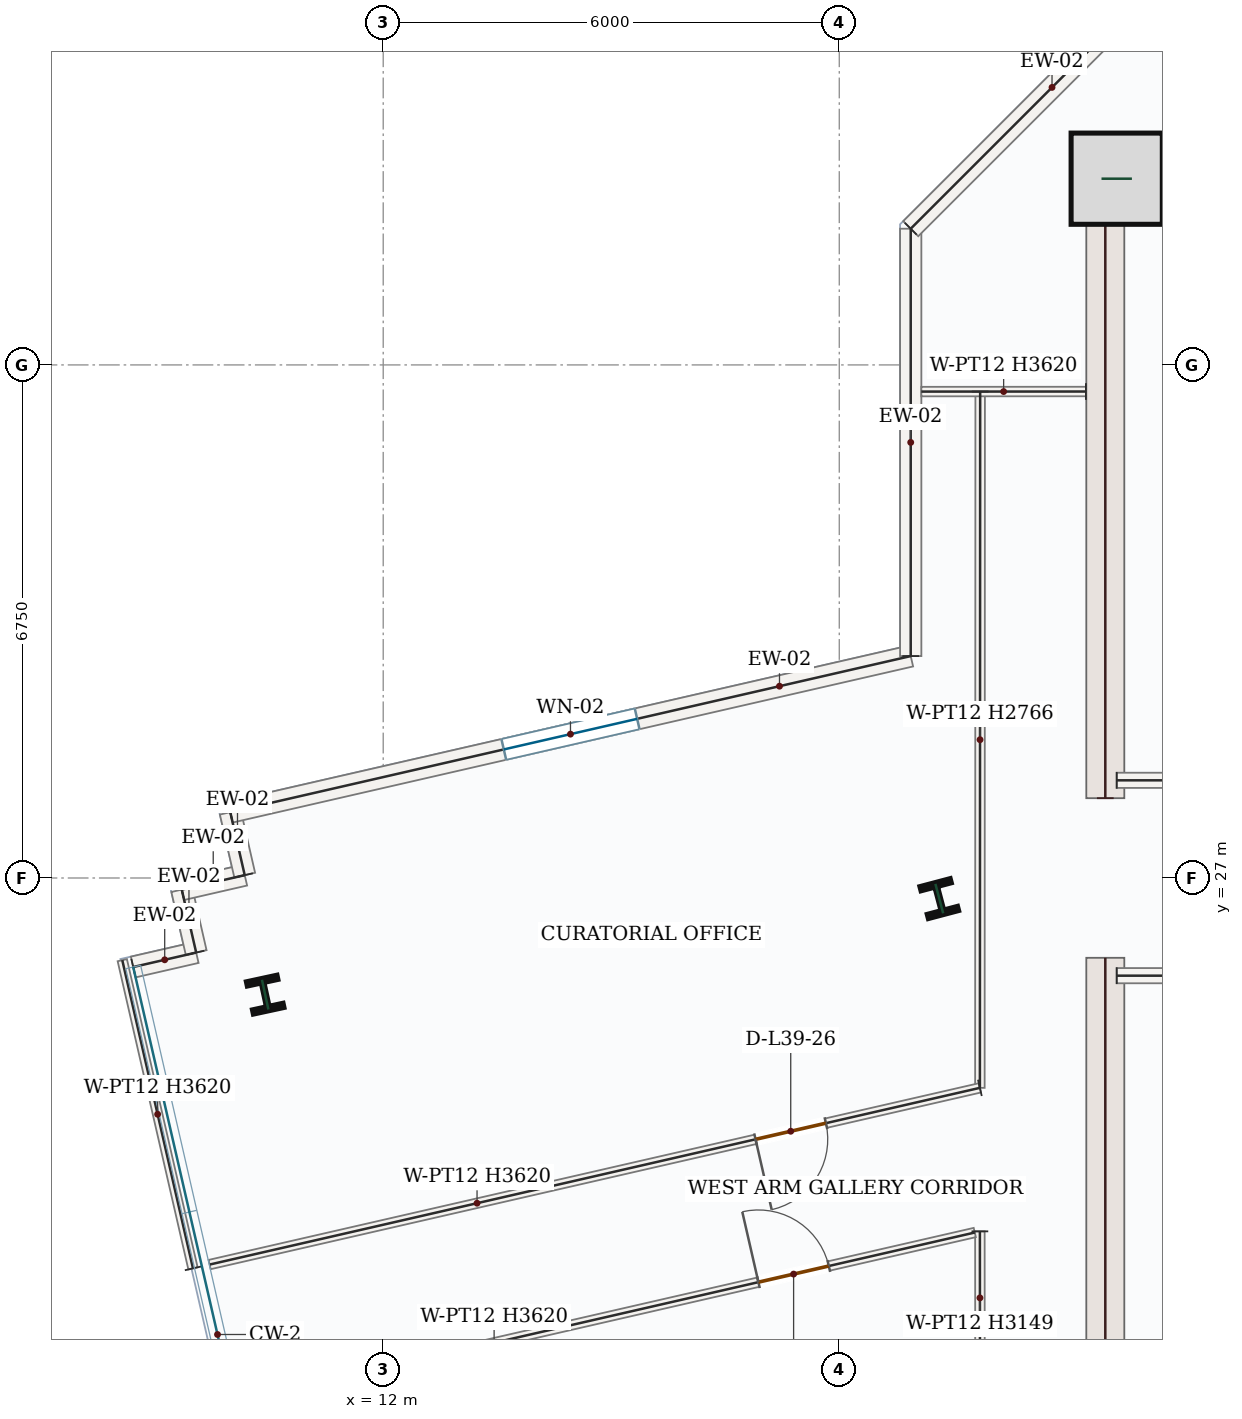
"""IFC4 building model, lengths in metres.
Left out: names, types, materials, properties, quantities, classifications, styles, units other than length and angle.
Written with IfcOpenShell. Run it as: python <this file> out.ifc"""

import sys

from ifc_helpers import new_model, si_unit, direction, frame, frame_2d, origin, origin_2d, place, context, subcontext, project, spatial, rectangle, i_section, extrude, source, transform, mapped, element, fill, save


model = new_model("IFC4")
c1 = context("Model", 3, precision=1e-05, world=origin(), true_north=direction((0.0, 1.0)))
c2 = subcontext(c1, "Body", "Model", "MODEL_VIEW")
j1 = project(units=[si_unit("LENGTHUNIT", "METRE"), si_unit("PLANEANGLEUNIT", "RADIAN")], contexts=[c1])
p1 = place(None, origin())
s1 = spatial("IfcSite", under=j1, at=p1, CompositionType="ELEMENT")
p2 = place(p1, origin())
s2 = spatial("IfcBuilding", under=s1, at=p2, CompositionType="ELEMENT")
p3 = place(p2, frame((0.0, 0.0, 170.7)))
s3 = spatial("IfcBuildingStorey", under=s2, at=p3, CompositionType="ELEMENT", Elevation=170.7)
m1 = source(origin(), c2, "Body", "SweptSolid", [
    extrude(rectangle(XDim=8.55, YDim=0.5, at=frame_2d((4.275, 0.0))), origin(), (0.0, 0.0, 1.0), 3.62),
])
for number, where, z_axis, x_axis in (
    (1, (21.5, 17.4, 0.0), (0.0, 0.0, 1.0), (0.0, 1.0, 0.0)),
    (2, (21.5, 28.05, 0.0), (0.0, 0.0, 1.0), (0.0, 1.0, 0.0)),
):
    element("IfcWall", number, at=place(p3, frame(where, z_axis=z_axis, x_axis=x_axis)), inside=s3, PredefinedType="SHEAR", context=c2, shape_type="MappedRepresentation", body=[
        mapped(m1, transform((0.0, 0.0, 0.0), x_axis=(1.0, 0.0, 0.0), y_axis=(0.0, 1.0, 0.0), z_axis=(0.0, 0.0, 1.0), scale=1.0)),
    ])
m2 = source(origin(), c2, "Body", "SweptSolid", [
    extrude(rectangle(XDim=7.0, YDim=0.5, at=frame_2d((3.5, 0.0))), origin(), (0.0, 0.0, 1.0), 3.62),
])
p4 = place(p3, frame((21.75, 36.35, 0.0), z_axis=(0.0, 0.0, 1.0), x_axis=(1.0, 0.0, 0.0)))
e3 = element("IfcWall", 3, at=p4, inside=s3, PredefinedType="SHEAR", context=c2, shape_type="MappedRepresentation", body=[
    mapped(m2, transform((0.0, 0.0, 0.0), x_axis=(1.0, 0.0, 0.0), y_axis=(0.0, 1.0, 0.0), z_axis=(0.0, 0.0, 1.0), scale=1.0)),
])
m3 = source(origin(), c2, "Body", "SweptSolid", [
    extrude(rectangle(XDim=1.2, YDim=1.2, at=origin_2d()), origin(), (0.0, 0.0, 1.0), 3.9),
])
p5 = place(p3, frame((21.65, 36.2, 0.0), z_axis=(0.0, 0.0, 1.0), x_axis=(1.0, 0.0, 0.0)))
e4 = element("IfcColumn", 4, at=p5, inside=s3, PredefinedType="COLUMN", context=c2, shape_type="MappedRepresentation", body=[
    mapped(m3, transform((0.0, 0.0, 0.0), x_axis=(1.0, 0.0, 0.0), y_axis=(0.0, 1.0, 0.0), z_axis=(0.0, 0.0, 1.0), scale=1.0)),
])
m4 = source(origin(), c2, "Body", "SweptSolid", [
    extrude(i_section(OverallWidth=0.412, OverallDepth=0.435, WebThickness=0.036, FlangeThickness=0.057, FilletRadius=0.018, at=origin_2d()), origin(), (0.0, 0.0, 1.0), 3.9),
])
for number, where, z_axis, x_axis in (
    (5, (19.316, 26.729, 0.0), (0.0, 0.0, 1.0), (0.967, 0.255, 0.0)),
    (6, (10.447, 25.465, 0.0), (0.0, 0.0, 1.0), (0.977, 0.211, 0.0)),
):
    element("IfcColumn", number, at=place(p3, frame(where, z_axis=z_axis, x_axis=x_axis)), inside=s3, PredefinedType="COLUMN", context=c2, shape_type="MappedRepresentation", body=[
        mapped(m4, transform((0.0, 0.0, 0.0), x_axis=(1.0, 0.0, 0.0), y_axis=(0.0, 1.0, 0.0), z_axis=(0.0, 0.0, 1.0), scale=1.0)),
    ])
m5 = source(origin(), c2, "Body", "SweptSolid", [
    extrude(rectangle(XDim=0.85, YDim=0.28, at=frame_2d((0.425, 0.0))), origin(), (0.0, 0.0, 1.0), 3.62),
])
p6 = place(p3, frame((8.711, 25.829, 0.0), z_axis=(0.0, 0.0, 1.0), x_axis=(0.974704946586, 0.223495563939, 0.0)))
e7 = element("IfcWall", 7, at=p6, inside=s3, PredefinedType="SOLIDWALL", context=c2, shape_type="MappedRepresentation", body=[
    mapped(m5, transform((0.0, 0.0, 0.0), x_axis=(1.0, 0.0, 0.0), y_axis=(0.0, 1.0, 0.0), z_axis=(0.0, 0.0, 1.0), scale=1.0)),
])
m6 = source(origin(), c2, "Body", "SweptSolid", [
    extrude(rectangle(XDim=0.85, YDim=0.28, at=frame_2d((0.425, 0.0))), origin(), (0.0, 0.0, 1.0), 3.62),
])
p7 = place(p3, frame((9.539, 26.019, 0.0), z_axis=(0.0, 0.0, 1.0), x_axis=(-0.22316012353, 0.974781800849, 0.0)))
e8 = element("IfcWall", 8, at=p7, inside=s3, PredefinedType="SOLIDWALL", context=c2, shape_type="MappedRepresentation", body=[
    mapped(m6, transform((0.0, 0.0, 0.0), x_axis=(1.0, 0.0, 0.0), y_axis=(0.0, 1.0, 0.0), z_axis=(0.0, 0.0, 1.0), scale=1.0)),
])
for number, where, z_axis, x_axis in (
    (9, (9.35, 26.847, 0.0), (0.0, 0.0, 1.0), (0.975, 0.223, 0.0)),
    (10, (10.178, 27.037, 0.0), (0.0, 0.0, 1.0), (-0.224, 0.975, 0.0)),
):
    element("IfcWall", number, at=place(p3, frame(where, z_axis=z_axis, x_axis=x_axis)), inside=s3, PredefinedType="SOLIDWALL", context=c2, shape_type="MappedRepresentation", body=[
        mapped(m5, transform((0.0, 0.0, 0.0), x_axis=(1.0, 0.0, 0.0), y_axis=(0.0, 1.0, 0.0), z_axis=(0.0, 0.0, 1.0), scale=1.0)),
    ])
p8 = place(p3, frame((9.988, 27.866, 0.0), z_axis=(0.0, 0.0, 1.0), x_axis=(0.974680686557, 0.223601340005, 0.0)))
e11 = element("IfcWall", 11, at=p8, inside=s3, PredefinedType="SOLIDWALL", context=c2, shape_type="SweptSolid", body=[
    extrude(rectangle(XDim=9.185, YDim=0.28, at=frame_2d((4.592, 0.0))), origin(), (0.0, 0.0, 1.0), 3.62),
])
p9 = place(p8, frame((3.692, 0.0, 0.85)))
e12 = element("IfcOpeningElement", 12, at=p9, cuts=e11, PredefinedType="OPENING", context=c2, shape_type="SweptSolid", body=[
    extrude(rectangle(XDim=1.8, YDim=1.75, at=frame_2d((0.9, 0.875))), frame((0.0, 0.15, 0.0), z_axis=(0.0, -1.0, 0.0), x_axis=(1.0, 0.0, 0.0)), (0.0, 0.0, 1.0), 0.3),
])
m7 = source(origin(), c2, "Body", "SweptSolid", [
    extrude(rectangle(XDim=5.623, YDim=0.28, at=frame_2d((2.811, 0.0))), origin(), (0.0, 0.0, 1.0), 3.62),
])
p10 = place(p3, frame((18.94, 29.919, 0.0), z_axis=(0.0, 0.0, 1.0), x_axis=(0.0, 1.0, 0.0)))
e13 = element("IfcWall", 13, at=p10, inside=s3, PredefinedType="SOLIDWALL", context=c2, shape_type="MappedRepresentation", body=[
    mapped(m7, transform((0.0, 0.0, 0.0), x_axis=(1.0, 0.0, 0.0), y_axis=(0.0, 1.0, 0.0), z_axis=(0.0, 0.0, 1.0), scale=1.0)),
])
m8 = source(origin(), c2, "Body", "SweptSolid", [
    extrude(rectangle(XDim=5.258, YDim=0.28, at=frame_2d((2.629, 0.0))), origin(), (0.0, 0.0, 1.0), 3.62),
])
p11 = place(p3, frame((18.94, 35.542, 0.0), z_axis=(0.0, 0.0, 1.0), x_axis=(0.707106781187, 0.707106781187, 0.0)))
e14 = element("IfcWall", 14, at=p11, inside=s3, PredefinedType="SOLIDWALL", context=c2, shape_type="MappedRepresentation", body=[
    mapped(m8, transform((0.0, 0.0, 0.0), x_axis=(1.0, 0.0, 0.0), y_axis=(0.0, 1.0, 0.0), z_axis=(0.0, 0.0, 1.0), scale=1.0)),
])
m9 = source(origin(), c2, "Body", "SweptSolid", [
    extrude(rectangle(XDim=4.25, YDim=0.2, at=frame_2d((2.125, 0.0))), origin(), (0.0, 0.0, 1.0), 3.62),
])
for number, where, z_axis, x_axis in (
    (15, (21.65, 25.715, 0.0), (0.0, 0.0, 1.0), (1.0, 0.0, 0.0)),
    (16, (21.65, 28.285, 0.0), (0.0, 0.0, 1.0), (1.0, 0.0, 0.0)),
):
    element("IfcWall", number, at=place(p3, frame(where, z_axis=z_axis, x_axis=x_axis)), inside=s3, PredefinedType="SOLIDWALL", context=c2, shape_type="MappedRepresentation", body=[
        mapped(m9, transform((0.0, 0.0, 0.0), x_axis=(1.0, 0.0, 0.0), y_axis=(0.0, 1.0, 0.0), z_axis=(0.0, 0.0, 1.0), scale=1.0)),
    ])
m10 = source(origin(), c2, "Body", "SweptSolid", [
    extrude(rectangle(XDim=9.16, YDim=0.125, at=frame_2d((4.58, 0.0))), origin(), (0.0, 0.0, 1.0), 2.766),
])
p12 = place(p3, frame((19.854, 33.399, 0.0), z_axis=(0.0, 0.0, 1.0), x_axis=(-0.000399776093, -0.99999992009, 0.0)))
e17 = element("IfcWall", 17, at=p12, inside=s3, PredefinedType="PARTITIONING", context=c2, shape_type="MappedRepresentation", body=[
    mapped(m10, transform((0.0, 0.0, 0.0), x_axis=(1.0, 0.0, 0.0), y_axis=(0.0, 1.0, 0.0), z_axis=(0.0, 0.0, 1.0), scale=1.0)),
])
p13 = place(p3, frame((19.85, 24.239, 0.0), z_axis=(0.0, 0.0, 1.0), x_axis=(-0.974685214681, -0.223581600949, 0.0)))
e18 = element("IfcWall", 18, at=p13, inside=s3, PredefinedType="PARTITIONING", context=c2, shape_type="SweptSolid", body=[
    extrude(rectangle(XDim=10.396, YDim=0.125, at=frame_2d((5.198, 0.0))), origin(), (0.0, 0.0, 1.0), 3.62),
])
p14 = place(p13, frame((2.078, 0.0, 0.0)))
e19 = element("IfcOpeningElement", 19, at=p14, cuts=e18, PredefinedType="OPENING", context=c2, shape_type="SweptSolid", body=[
    extrude(rectangle(XDim=0.95, YDim=2.15, at=frame_2d((0.475, 1.075))), frame((0.0, 0.073, 0.0), z_axis=(0.0, -1.0, 0.0), x_axis=(1.0, 0.0, 0.0)), (0.0, 0.0, 1.0), 0.145),
])
m11 = source(origin(), c2, "Body", "SweptSolid", [
    extrude(rectangle(XDim=4.16, YDim=0.125, at=frame_2d((2.08, 0.0))), origin(), (0.0, 0.0, 1.0), 3.62),
])
p15 = place(p3, frame((9.497, 21.864, 0.0), z_axis=(0.0, 0.0, 1.0), x_axis=(-0.223599186995, 0.974681180477, 0.0)))
e20 = element("IfcWall", 20, at=p15, inside=s3, PredefinedType="PARTITIONING", context=c2, shape_type="MappedRepresentation", body=[
    mapped(m11, transform((0.0, 0.0, 0.0), x_axis=(1.0, 0.0, 0.0), y_axis=(0.0, 1.0, 0.0), z_axis=(0.0, 0.0, 1.0), scale=1.0)),
])
m12 = source(origin(), c2, "Body", "SweptSolid", [
    extrude(rectangle(XDim=2.165, YDim=0.125, at=frame_2d((1.083, 0.0))), origin(), (0.0, 0.0, 1.0), 3.62),
])
p16 = place(p3, frame((21.245, 33.4, 0.0), z_axis=(0.0, 0.0, 1.0), x_axis=(-0.999999942778, -0.000338294974, 0.0)))
e21 = element("IfcWall", 21, at=p16, inside=s3, PredefinedType="PARTITIONING", context=c2, shape_type="MappedRepresentation", body=[
    mapped(m12, transform((0.0, 0.0, 0.0), x_axis=(1.0, 0.0, 0.0), y_axis=(0.0, 1.0, 0.0), z_axis=(0.0, 0.0, 1.0), scale=1.0)),
])
m13 = source(origin(), c2, "Body", "SweptSolid", [
    extrude(rectangle(XDim=1.75, YDim=0.125, at=frame_2d((0.875, 0.0))), origin(), (0.0, 0.0, 1.0), 3.149),
])
p17 = place(p3, frame((19.85, 22.351, 0.0), z_axis=(0.0, 0.0, 1.0), x_axis=(0.000557957787, -0.999999844342, 0.0)))
e22 = element("IfcWall", 22, at=p17, inside=s3, PredefinedType="PARTITIONING", context=c2, shape_type="MappedRepresentation", body=[
    mapped(m13, transform((0.0, 0.0, 0.0), x_axis=(1.0, 0.0, 0.0), y_axis=(0.0, 1.0, 0.0), z_axis=(0.0, 0.0, 1.0), scale=1.0)),
])
p18 = place(p3, frame((10.128, 20.121, 0.0), z_axis=(0.0, 0.0, 1.0), x_axis=(0.974684890892, 0.223583012474, 0.0)))
e23 = element("IfcWall", 23, at=p18, inside=s3, PredefinedType="PARTITIONING", context=c2, shape_type="SweptSolid", body=[
    extrude(rectangle(XDim=9.905, YDim=0.125, at=frame_2d((4.953, 0.0))), origin(), (0.0, 0.0, 1.0), 3.62),
])
p19 = place(p18, frame((6.985, 0.0, 0.0)))
e24 = element("IfcOpeningElement", 24, at=p19, cuts=e23, PredefinedType="OPENING", context=c2, shape_type="SweptSolid", body=[
    extrude(rectangle(XDim=0.95, YDim=2.15, at=frame_2d((0.475, 1.075))), frame((0.0, 0.073, 0.0), z_axis=(0.0, -1.0, 0.0), x_axis=(1.0, 0.0, 0.0)), (0.0, 0.0, 1.0), 0.145),
])
m14 = source(origin(), c2, "Body", "SweptSolid", [
    extrude(rectangle(XDim=1.8, YDim=1.75, at=frame_2d((0.9, 0.875))), frame((0.0, 0.03, 0.0), z_axis=(0.0, -1.0, 0.0), x_axis=(1.0, 0.0, 0.0)), (0.0, 0.0, 1.0), 0.06),
])
p20 = place(p9, origin())
e25 = element("IfcWindow", 25, at=p20, inside=s3, PartitioningType="DOUBLE_PANEL_VERTICAL", PredefinedType="WINDOW", context=c2, shape_type="MappedRepresentation", body=[
    mapped(m14, transform((0.0, 0.0, 0.0), x_axis=(1.0, 0.0, 0.0), y_axis=(0.0, 1.0, 0.0), z_axis=(0.0, 0.0, 1.0), scale=1.0)),
])
fill(e12, e25)
m15 = source(origin(), c2, "Body", "SweptSolid", [
    extrude(rectangle(XDim=0.95, YDim=2.15, at=frame_2d((0.475, 1.075))), frame((0.0, 0.025, 0.0), z_axis=(0.0, -1.0, 0.0), x_axis=(1.0, 0.0, 0.0)), (0.0, 0.0, 1.0), 0.05),
])
p21 = place(p14, origin())
e26 = element("IfcDoor", 26, at=p21, inside=s3, OperationType="SINGLE_SWING_RIGHT", PredefinedType="DOOR", context=c2, shape_type="MappedRepresentation", body=[
    mapped(m15, transform((0.0, 0.0, 0.0), x_axis=(1.0, 0.0, 0.0), y_axis=(0.0, 1.0, 0.0), z_axis=(0.0, 0.0, 1.0), scale=1.0)),
])
fill(e19, e26)
p22 = place(p19, origin())
e27 = element("IfcDoor", 27, at=p22, inside=s3, OperationType="SINGLE_SWING_LEFT", PredefinedType="DOOR", context=c2, shape_type="MappedRepresentation", body=[
    mapped(m15, transform((0.0, 0.0, 0.0), x_axis=(1.0, 0.0, 0.0), y_axis=(0.0, 1.0, 0.0), z_axis=(0.0, 0.0, 1.0), scale=1.0)),
])
fill(e24, e27)
save(model, sys.argv[1])
